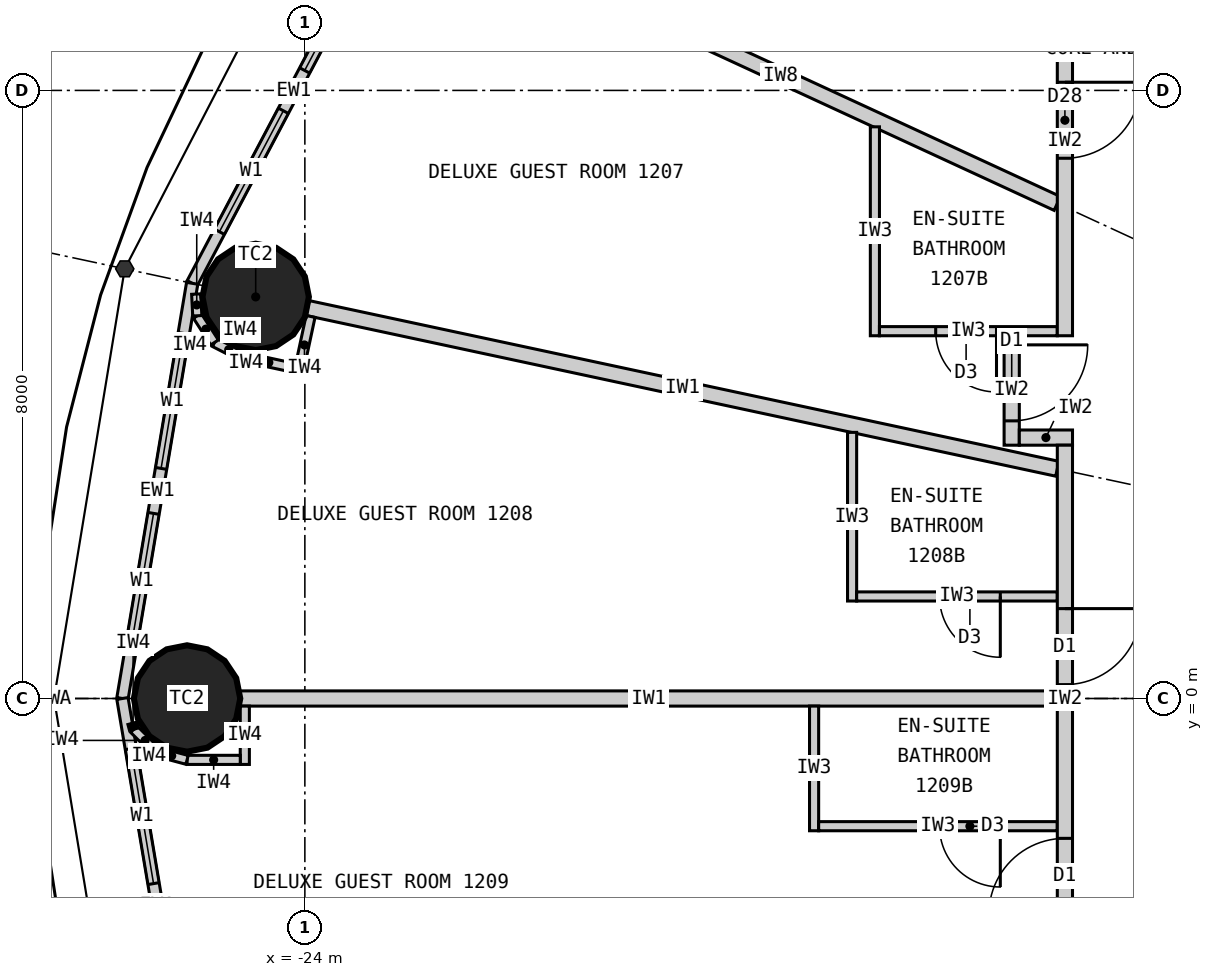
"""IFC4 building model, lengths in metres.
Left out: names, types, materials, properties, quantities, classifications, styles, units other than length and angle.
Written with IfcOpenShell. Run it as: python <this file> out.ifc"""

import sys

from ifc_helpers import new_model, si_unit, direction, frame, frame_2d, origin, origin_2d, place, context, subcontext, project, spatial, rectangle, circle, extrude, element, fill, save


model = new_model("IFC4")
c1 = context("Model", 3, precision=1e-05, world=origin(), true_north=direction((0.0, 1.0)))
c2 = subcontext(c1, "Body", "Model", "MODEL_VIEW")
j1 = project(units=[si_unit("LENGTHUNIT", "METRE"), si_unit("PLANEANGLEUNIT", "RADIAN")], contexts=[c1])
p1 = place(None, origin())
s1 = spatial("IfcSite", under=j1, at=p1, CompositionType="ELEMENT")
p2 = place(p1, origin())
s2 = spatial("IfcBuilding", under=s1, at=p2, CompositionType="ELEMENT")
p3 = place(p2, frame((0.0, 0.0, 54.0)))
s3 = spatial("IfcBuildingStorey", under=s2, at=p3, CompositionType="ELEMENT", Elevation=54.0)
for number, where, z_axis, x_axis in (
    (1, (-24.647, 5.283, 0.0), (0.0, 0.0, 1.0), (1.0, 0.0, 0.0)),
    (2, (-25.55, 0.0, 0.0), (0.0, 0.0, 1.0), (1.0, 0.0, 0.0)),
):
    element("IfcColumn", number, at=place(p3, frame(where, z_axis=z_axis, x_axis=x_axis)), inside=s3, PredefinedType="COLUMN", context=c2, shape_type="SweptSolid", body=[
        extrude(circle(Radius=0.7, at=origin_2d()), origin(), (0.0, 0.0, 1.0), 3.3),
    ])
p4 = place(p3, frame((-22.803, 10.532, 0.0), z_axis=(0.0, 0.0, 1.0), x_axis=(-0.467296867008, -0.884100468321, 0.0)))
e3 = element("IfcWall", 3, at=p4, inside=s3, PredefinedType="ELEMENTEDWALL", context=c2, shape_type="SweptSolid", body=[
    extrude(rectangle(XDim=5.734, YDim=0.15, at=frame_2d((2.867, 0.0))), origin(), (0.0, 0.0, 1.0), 3.12),
])
p5 = place(p4, frame((0.767, 0.0, 0.9)))
e4 = element("IfcOpeningElement", 4, at=p5, cuts=e3, PredefinedType="OPENING", context=c2, shape_type="SweptSolid", body=[
    extrude(rectangle(XDim=1.8, YDim=1.9, at=frame_2d((0.9, 0.95))), frame((0.0, 0.085, 0.0), z_axis=(0.0, -1.0, 0.0), x_axis=(1.0, 0.0, 0.0)), (0.0, 0.0, 1.0), 0.17),
])
p6 = place(p4, frame((3.167, 0.0, 0.9)))
e5 = element("IfcOpeningElement", 5, at=p6, cuts=e3, PredefinedType="OPENING", context=c2, shape_type="SweptSolid", body=[
    extrude(rectangle(XDim=1.8, YDim=1.9, at=frame_2d((0.9, 0.95))), frame((0.0, 0.085, 0.0), z_axis=(0.0, -1.0, 0.0), x_axis=(1.0, 0.0, 0.0)), (0.0, 0.0, 1.0), 0.17),
])
p7 = place(p3, frame((-25.482, 5.462, 0.0), z_axis=(0.0, 0.0, 1.0), x_axis=(-0.165642551694, -0.986185857264, 0.0)))
e6 = element("IfcWall", 6, at=p7, inside=s3, PredefinedType="ELEMENTEDWALL", context=c2, shape_type="SweptSolid", body=[
    extrude(rectangle(XDim=5.539, YDim=0.15, at=frame_2d((2.77, 0.0))), origin(), (0.0, 0.0, 1.0), 3.12),
])
p8 = place(p7, frame((0.669, 0.0, 0.9)))
e7 = element("IfcOpeningElement", 7, at=p8, cuts=e6, PredefinedType="OPENING", context=c2, shape_type="SweptSolid", body=[
    extrude(rectangle(XDim=1.8, YDim=1.9, at=frame_2d((0.9, 0.95))), frame((0.0, 0.085, 0.0), z_axis=(0.0, -1.0, 0.0), x_axis=(1.0, 0.0, 0.0)), (0.0, 0.0, 1.0), 0.17),
])
p9 = place(p7, frame((3.07, 0.0, 0.9)))
e8 = element("IfcOpeningElement", 8, at=p9, cuts=e6, PredefinedType="OPENING", context=c2, shape_type="SweptSolid", body=[
    extrude(rectangle(XDim=1.8, YDim=1.9, at=frame_2d((0.9, 0.95))), frame((0.0, 0.085, 0.0), z_axis=(0.0, -1.0, 0.0), x_axis=(1.0, 0.0, 0.0)), (0.0, 0.0, 1.0), 0.17),
])
p10 = place(p3, frame((-26.4, 0.0, 0.0), z_axis=(0.0, 0.0, 1.0), x_axis=(0.165642551694, -0.986185857264, 0.0)))
e9 = element("IfcWall", 9, at=p10, inside=s3, PredefinedType="ELEMENTEDWALL", context=c2, shape_type="SweptSolid", body=[
    extrude(rectangle(XDim=5.539, YDim=0.15, at=frame_2d((2.77, 0.0))), origin(), (0.0, 0.0, 1.0), 3.12),
])
p11 = place(p10, frame((0.669, 0.0, 0.9)))
e10 = element("IfcOpeningElement", 10, at=p11, cuts=e9, PredefinedType="OPENING", context=c2, shape_type="SweptSolid", body=[
    extrude(rectangle(XDim=1.8, YDim=1.9, at=frame_2d((0.9, 0.95))), frame((0.0, 0.085, 0.0), z_axis=(0.0, -1.0, 0.0), x_axis=(1.0, 0.0, 0.0)), (0.0, 0.0, 1.0), 0.17),
])
p12 = place(p10, frame((3.07, 0.0, 0.9)))
e11 = element("IfcOpeningElement", 11, at=p12, cuts=e9, PredefinedType="OPENING", context=c2, shape_type="SweptSolid", body=[
    extrude(rectangle(XDim=1.8, YDim=1.9, at=frame_2d((0.9, 0.95))), frame((0.0, 0.085, 0.0), z_axis=(0.0, -1.0, 0.0), x_axis=(1.0, 0.0, 0.0)), (0.0, 0.0, 1.0), 0.17),
])
p13 = place(p3, frame((-14.1, 6.512, 0.0), z_axis=(0.0, 0.0, 1.0), x_axis=(-0.907832871056, 0.419332181247, 0.0)))
e12 = element("IfcWall", 12, at=p13, inside=s3, PredefinedType="PARTITIONING", context=c2, shape_type="SweptSolid", body=[
    extrude(rectangle(XDim=8.023, YDim=0.2, at=frame_2d((4.011, 0.0))), origin(), (0.0, 0.0, 1.0), 2.32),
])
p14 = place(p3, frame((-14.1, 3.022, 0.0), z_axis=(0.0, 0.0, 1.0), x_axis=(-0.977790014929, 0.209586943072, 0.0)))
e13 = element("IfcWall", 13, at=p14, inside=s3, PredefinedType="PARTITIONING", context=c2, shape_type="SweptSolid", body=[
    extrude(rectangle(XDim=10.087, YDim=0.2, at=frame_2d((5.043, 0.0))), origin(), (0.0, 0.0, 1.0), 2.32),
])
p15 = place(p3, frame((-14.1, 0.0, 0.0), z_axis=(0.0, 0.0, 1.0), x_axis=(-1.0, 0.0, 0.0)))
e14 = element("IfcWall", 14, at=p15, inside=s3, PredefinedType="PARTITIONING", context=c2, shape_type="SweptSolid", body=[
    extrude(rectangle(XDim=10.75, YDim=0.2, at=frame_2d((5.375, 0.0))), origin(), (0.0, 0.0, 1.0), 2.27),
])
p16 = place(p3, frame((-16.5, 7.521, 0.0), z_axis=(0.0, 0.0, 1.0), x_axis=(0.0, -1.0, 0.0)))
e15 = element("IfcWall", 15, at=p16, inside=s3, PredefinedType="PARTITIONING", context=c2, shape_type="SweptSolid", body=[
    extrude(rectangle(XDim=2.749, YDim=0.12, at=frame_2d((1.374, 0.0))), origin(), (0.0, 0.0, 1.0), 3.12),
])
p17 = place(p3, frame((-14.1, 4.833, 0.0), z_axis=(0.0, 0.0, 1.0), x_axis=(-1.0, 0.0, 0.0)))
e16 = element("IfcWall", 16, at=p17, inside=s3, PredefinedType="PARTITIONING", context=c2, shape_type="SweptSolid", body=[
    extrude(rectangle(XDim=2.34, YDim=0.12, at=frame_2d((1.17, 0.0))), origin(), (0.0, 0.0, 1.0), 3.12),
])
p18 = place(p17, frame((0.8, 0.0, 0.0)))
e17 = element("IfcOpeningElement", 17, at=p18, cuts=e16, PredefinedType="OPENING", context=c2, shape_type="SweptSolid", body=[
    extrude(rectangle(XDim=0.8, YDim=2.1, at=frame_2d((0.4, 1.05))), frame((0.0, 0.07, 0.0), z_axis=(0.0, -1.0, 0.0), x_axis=(1.0, 0.0, 0.0)), (0.0, 0.0, 1.0), 0.14),
])
p19 = place(p3, frame((-16.8, 3.501, 0.0), z_axis=(0.0, 0.0, 1.0), x_axis=(0.0, -1.0, 0.0)))
e18 = element("IfcWall", 18, at=p19, inside=s3, PredefinedType="PARTITIONING", context=c2, shape_type="SweptSolid", body=[
    extrude(rectangle(XDim=2.219, YDim=0.12, at=frame_2d((1.109, 0.0))), origin(), (0.0, 0.0, 1.0), 3.12),
])
p20 = place(p3, frame((-14.1, 1.343, 0.0), z_axis=(0.0, 0.0, 1.0), x_axis=(-1.0, 0.0, 0.0)))
e19 = element("IfcWall", 19, at=p20, inside=s3, PredefinedType="PARTITIONING", context=c2, shape_type="SweptSolid", body=[
    extrude(rectangle(XDim=2.64, YDim=0.12, at=frame_2d((1.32, 0.0))), origin(), (0.0, 0.0, 1.0), 3.12),
])
p21 = place(p20, frame((0.75, 0.0, 0.0)))
e20 = element("IfcOpeningElement", 20, at=p21, cuts=e19, PredefinedType="OPENING", context=c2, shape_type="SweptSolid", body=[
    extrude(rectangle(XDim=0.8, YDim=2.1, at=frame_2d((0.4, 1.05))), frame((0.0, 0.07, 0.0), z_axis=(0.0, -1.0, 0.0), x_axis=(1.0, 0.0, 0.0)), (0.0, 0.0, 1.0), 0.14),
])
p22 = place(p3, frame((-17.3, -0.1, 0.0), z_axis=(0.0, 0.0, 1.0), x_axis=(0.0, -1.0, 0.0)))
e21 = element("IfcWall", 21, at=p22, inside=s3, PredefinedType="PARTITIONING", context=c2, shape_type="SweptSolid", body=[
    extrude(rectangle(XDim=1.64, YDim=0.12, at=frame_2d((0.82, 0.0))), origin(), (0.0, 0.0, 1.0), 3.12),
])
p23 = place(p3, frame((-14.1, -1.68, 0.0), z_axis=(0.0, 0.0, 1.0), x_axis=(-1.0, 0.0, 0.0)))
e22 = element("IfcWall", 22, at=p23, inside=s3, PredefinedType="PARTITIONING", context=c2, shape_type="SweptSolid", body=[
    extrude(rectangle(XDim=3.14, YDim=0.12, at=frame_2d((1.57, 0.0))), origin(), (0.0, 0.0, 1.0), 3.12),
])
p24 = place(p23, frame((0.75, 0.0, 0.0)))
e23 = element("IfcOpeningElement", 23, at=p24, cuts=e22, PredefinedType="OPENING", context=c2, shape_type="SweptSolid", body=[
    extrude(rectangle(XDim=0.8, YDim=2.1, at=frame_2d((0.4, 1.05))), frame((0.0, 0.07, 0.0), z_axis=(0.0, -1.0, 0.0), x_axis=(1.0, 0.0, 0.0)), (0.0, 0.0, 1.0), 0.14),
])
p25 = place(p3, frame((-14.7, 4.772, 0.0), z_axis=(0.0, 0.0, 1.0), x_axis=(0.0, -1.0, 0.0)))
e24 = element("IfcWall", 24, at=p25, inside=s3, PredefinedType="PARTITIONING", context=c2, shape_type="SweptSolid", body=[
    extrude(rectangle(XDim=1.44, YDim=0.2, at=frame_2d((0.72, 0.0))), origin(), (0.0, 0.0, 1.0), 3.12),
])
p26 = place(p25, frame((0.12, 0.0, 0.0)))
e25 = element("IfcOpeningElement", 25, at=p26, cuts=e24, PredefinedType="OPENING", context=c2, shape_type="SweptSolid", body=[
    extrude(rectangle(XDim=1.0, YDim=2.2, at=frame_2d((0.5, 1.1))), frame((0.0, 0.11, 0.0), z_axis=(0.0, -1.0, 0.0), x_axis=(1.0, 0.0, 0.0)), (0.0, 0.0, 1.0), 0.22),
])
p27 = place(p3, frame((-13.9, 3.433, 0.0), z_axis=(0.0, 0.0, 1.0), x_axis=(-1.0, 0.0, 0.0)))
e26 = element("IfcWall", 26, at=p27, inside=s3, PredefinedType="PARTITIONING", context=c2, shape_type="SweptSolid", body=[
    extrude(rectangle(XDim=0.7, YDim=0.2, at=frame_2d((0.35, 0.0))), origin(), (0.0, 0.0, 1.0), 2.32),
])
p28 = place(p3, frame((-14.0, 9.9, 0.0), z_axis=(0.0, 0.0, 1.0), x_axis=(0.0, -1.0, 0.0)))
e27 = element("IfcWall", 27, at=p28, inside=s3, PredefinedType="PARTITIONING", context=c2, shape_type="SweptSolid", body=[
    extrude(rectangle(XDim=5.127, YDim=0.2, at=frame_2d((2.564, 0.0))), origin(), (0.0, 0.0, 1.0), 3.12),
])
p29 = place(p28, frame((1.792, 0.0, 0.0)))
e28 = element("IfcOpeningElement", 28, at=p29, cuts=e27, PredefinedType="OPENING", context=c2, shape_type="SweptSolid", body=[
    extrude(rectangle(XDim=1.0, YDim=2.2, at=frame_2d((0.5, 1.1))), frame((0.0, 0.11, 0.0), z_axis=(0.0, -1.0, 0.0), x_axis=(1.0, 0.0, 0.0)), (0.0, 0.0, 1.0), 0.22),
])
p30 = place(p3, frame((-14.0, 3.333, 0.0), z_axis=(0.0, 0.0, 1.0), x_axis=(0.0, -1.0, 0.0)))
e29 = element("IfcWall", 29, at=p30, inside=s3, PredefinedType="PARTITIONING", context=c2, shape_type="SweptSolid", body=[
    extrude(rectangle(XDim=6.665, YDim=0.2, at=frame_2d((3.333, 0.0))), origin(), (0.0, 0.0, 1.0), 3.12),
])
p31 = place(p30, frame((2.15, 0.0, 0.0)))
e30 = element("IfcOpeningElement", 30, at=p31, cuts=e29, PredefinedType="OPENING", context=c2, shape_type="SweptSolid", body=[
    extrude(rectangle(XDim=1.0, YDim=2.2, at=frame_2d((0.5, 1.1))), frame((0.0, 0.11, 0.0), z_axis=(0.0, -1.0, 0.0), x_axis=(1.0, 0.0, 0.0)), (0.0, 0.0, 1.0), 0.22),
])
p32 = place(p30, frame((5.173, 0.0, 0.0)))
e31 = element("IfcOpeningElement", 31, at=p32, cuts=e29, PredefinedType="OPENING", context=c2, shape_type="SweptSolid", body=[
    extrude(rectangle(XDim=1.0, YDim=2.2, at=frame_2d((0.5, 1.1))), frame((0.0, 0.11, 0.0), z_axis=(0.0, -1.0, 0.0), x_axis=(1.0, 0.0, 0.0)), (0.0, 0.0, 1.0), 0.22),
])
p33 = place(p3, frame((-23.925, 5.026, 0.0), z_axis=(0.0, 0.0, 1.0), x_axis=(-0.209681192172, -0.977769808109, 0.0)))
e32 = element("IfcWall", 32, at=p33, inside=s3, PredefinedType="PARTITIONING", context=c2, shape_type="SweptSolid", body=[
    extrude(rectangle(XDim=0.767, YDim=0.12, at=frame_2d((0.384, 0.0))), origin(), (0.0, 0.0, 1.0), 3.12),
])
p34 = place(p3, frame((-24.132, 4.347, 0.0), z_axis=(0.0, 0.0, 1.0), x_axis=(-0.977776882509, 0.209648200638, 0.0)))
e33 = element("IfcWall", 33, at=p34, inside=s3, PredefinedType="PARTITIONING", context=c2, shape_type="SweptSolid", body=[
    extrude(rectangle(XDim=0.7, YDim=0.12, at=frame_2d((0.35, 0.0))), origin(), (0.0, 0.0, 1.0), 3.12),
])
for number, where, z_axis, x_axis in (
    (34, (-24.816, 4.494, 0.0), (0.0, 0.0, 1.0), (-0.89, 0.455, 0.0)),
    (35, (-25.188, 4.684, 0.0), (0.0, 0.0, 1.0), (-0.543, 0.84, 0.0)),
):
    element("IfcWall", number, at=place(p3, frame(where, z_axis=z_axis, x_axis=x_axis)), inside=s3, PredefinedType="PARTITIONING", context=c2, shape_type="SweptSolid", body=[
        extrude(rectangle(XDim=0.418, YDim=0.12, at=frame_2d((0.209, 0.0))), origin(), (0.0, 0.0, 1.0), 3.12),
    ])
p35 = place(p3, frame((-25.416, 5.035, 0.0), z_axis=(0.0, 0.0, 1.0), x_axis=(-0.050406329159, 0.998728793007, 0.0)))
e36 = element("IfcWall", 36, at=p35, inside=s3, PredefinedType="PARTITIONING", context=c2, shape_type="SweptSolid", body=[
    extrude(rectangle(XDim=0.286, YDim=0.12, at=frame_2d((0.143, 0.0))), origin(), (0.0, 0.0, 1.0), 3.12),
])
p36 = place(p3, frame((-24.79, -0.1, 0.0), z_axis=(0.0, 0.0, 1.0), x_axis=(0.0, -1.0, 0.0)))
e37 = element("IfcWall", 37, at=p36, inside=s3, PredefinedType="PARTITIONING", context=c2, shape_type="SweptSolid", body=[
    extrude(rectangle(XDim=0.767, YDim=0.12, at=frame_2d((0.384, 0.0))), origin(), (0.0, 0.0, 1.0), 3.12),
])
p37 = place(p3, frame((-24.85, -0.808, 0.0), z_axis=(0.0, 0.0, 1.0), x_axis=(-1.0, 0.0, 0.0)))
e38 = element("IfcWall", 38, at=p37, inside=s3, PredefinedType="PARTITIONING", context=c2, shape_type="SweptSolid", body=[
    extrude(rectangle(XDim=0.7, YDim=0.12, at=frame_2d((0.35, 0.0))), origin(), (0.0, 0.0, 1.0), 3.12),
])
p38 = place(p3, frame((-25.55, -0.808, 0.0), z_axis=(0.0, 0.0, 1.0), x_axis=(-0.965807183573, 0.2592614205, 0.0)))
e39 = element("IfcWall", 39, at=p38, inside=s3, PredefinedType="PARTITIONING", context=c2, shape_type="SweptSolid", body=[
    extrude(rectangle(XDim=0.418, YDim=0.12, at=frame_2d((0.209, 0.0))), origin(), (0.0, 0.0, 1.0), 3.12),
])
p39 = place(p3, frame((-25.954, -0.699, 0.0), z_axis=(0.0, 0.0, 1.0), x_axis=(-0.707106781187, 0.707106781187, 0.0)))
e40 = element("IfcWall", 40, at=p39, inside=s3, PredefinedType="PARTITIONING", context=c2, shape_type="SweptSolid", body=[
    extrude(rectangle(XDim=0.418, YDim=0.12, at=frame_2d((0.209, 0.0))), origin(), (0.0, 0.0, 1.0), 3.12),
])
p40 = place(p3, frame((-26.249, -0.404, 0.0), z_axis=(0.0, 0.0, 1.0), x_axis=(-0.259754282609, 0.965674744759, 0.0)))
e41 = element("IfcWall", 41, at=p40, inside=s3, PredefinedType="PARTITIONING", context=c2, shape_type="SweptSolid", body=[
    extrude(rectangle(XDim=0.08, YDim=0.12, at=frame_2d((0.04, 0.0))), origin(), (0.0, 0.0, 1.0), 3.12),
])
p41 = place(p5, origin())
e42 = element("IfcWindow", 42, at=p41, inside=s3, PartitioningType="SINGLE_PANEL", PredefinedType="WINDOW", context=c2, shape_type="SweptSolid", body=[
    extrude(rectangle(XDim=1.8, YDim=1.9, at=frame_2d((0.9, 0.95))), frame((0.0, 0.03, 0.0), z_axis=(0.0, -1.0, 0.0), x_axis=(1.0, 0.0, 0.0)), (0.0, 0.0, 1.0), 0.06),
])
fill(e4, e42)
p42 = place(p6, origin())
e43 = element("IfcWindow", 43, at=p42, inside=s3, PartitioningType="SINGLE_PANEL", PredefinedType="WINDOW", context=c2, shape_type="SweptSolid", body=[
    extrude(rectangle(XDim=1.8, YDim=1.9, at=frame_2d((0.9, 0.95))), frame((0.0, 0.03, 0.0), z_axis=(0.0, -1.0, 0.0), x_axis=(1.0, 0.0, 0.0)), (0.0, 0.0, 1.0), 0.06),
])
fill(e5, e43)
p43 = place(p8, origin())
e44 = element("IfcWindow", 44, at=p43, inside=s3, PartitioningType="SINGLE_PANEL", PredefinedType="WINDOW", context=c2, shape_type="SweptSolid", body=[
    extrude(rectangle(XDim=1.8, YDim=1.9, at=frame_2d((0.9, 0.95))), frame((0.0, 0.03, 0.0), z_axis=(0.0, -1.0, 0.0), x_axis=(1.0, 0.0, 0.0)), (0.0, 0.0, 1.0), 0.06),
])
fill(e7, e44)
p44 = place(p9, origin())
e45 = element("IfcWindow", 45, at=p44, inside=s3, PartitioningType="SINGLE_PANEL", PredefinedType="WINDOW", context=c2, shape_type="SweptSolid", body=[
    extrude(rectangle(XDim=1.8, YDim=1.9, at=frame_2d((0.9, 0.95))), frame((0.0, 0.03, 0.0), z_axis=(0.0, -1.0, 0.0), x_axis=(1.0, 0.0, 0.0)), (0.0, 0.0, 1.0), 0.06),
])
fill(e8, e45)
p45 = place(p11, origin())
e46 = element("IfcWindow", 46, at=p45, inside=s3, PartitioningType="SINGLE_PANEL", PredefinedType="WINDOW", context=c2, shape_type="SweptSolid", body=[
    extrude(rectangle(XDim=1.8, YDim=1.9, at=frame_2d((0.9, 0.95))), frame((0.0, 0.03, 0.0), z_axis=(0.0, -1.0, 0.0), x_axis=(1.0, 0.0, 0.0)), (0.0, 0.0, 1.0), 0.06),
])
fill(e10, e46)
p46 = place(p29, origin())
e47 = element("IfcDoor", 47, at=p46, inside=s3, OperationType="SINGLE_SWING_LEFT", PredefinedType="DOOR", context=c2, shape_type="SweptSolid", body=[
    extrude(rectangle(XDim=1.0, YDim=2.2, at=frame_2d((0.5, 1.1))), frame((0.0, 0.025, 0.0), z_axis=(0.0, -1.0, 0.0), x_axis=(1.0, 0.0, 0.0)), (0.0, 0.0, 1.0), 0.05),
])
fill(e28, e47)
p47 = place(p18, origin())
e48 = element("IfcDoor", 48, at=p47, inside=s3, OperationType="SINGLE_SWING_LEFT", PredefinedType="DOOR", context=c2, shape_type="SweptSolid", body=[
    extrude(rectangle(XDim=0.8, YDim=2.1, at=frame_2d((0.4, 1.05))), frame((0.0, 0.025, 0.0), z_axis=(0.0, -1.0, 0.0), x_axis=(1.0, 0.0, 0.0)), (0.0, 0.0, 1.0), 0.05),
])
fill(e17, e48)
p48 = place(p26, origin())
e49 = element("IfcDoor", 49, at=p48, inside=s3, OperationType="SINGLE_SWING_LEFT", PredefinedType="DOOR", context=c2, shape_type="SweptSolid", body=[
    extrude(rectangle(XDim=1.0, YDim=2.2, at=frame_2d((0.5, 1.1))), frame((0.0, 0.025, 0.0), z_axis=(0.0, -1.0, 0.0), x_axis=(1.0, 0.0, 0.0)), (0.0, 0.0, 1.0), 0.05),
])
fill(e25, e49)
p49 = place(p21, origin())
e50 = element("IfcDoor", 50, at=p49, inside=s3, OperationType="SINGLE_SWING_LEFT", PredefinedType="DOOR", context=c2, shape_type="SweptSolid", body=[
    extrude(rectangle(XDim=0.8, YDim=2.1, at=frame_2d((0.4, 1.05))), frame((0.0, 0.025, 0.0), z_axis=(0.0, -1.0, 0.0), x_axis=(1.0, 0.0, 0.0)), (0.0, 0.0, 1.0), 0.05),
])
fill(e20, e50)
p50 = place(p31, origin())
e51 = element("IfcDoor", 51, at=p50, inside=s3, OperationType="SINGLE_SWING_LEFT", PredefinedType="DOOR", context=c2, shape_type="SweptSolid", body=[
    extrude(rectangle(XDim=1.0, YDim=2.2, at=frame_2d((0.5, 1.1))), frame((0.0, 0.025, 0.0), z_axis=(0.0, -1.0, 0.0), x_axis=(1.0, 0.0, 0.0)), (0.0, 0.0, 1.0), 0.05),
])
fill(e30, e51)
p51 = place(p24, origin())
e52 = element("IfcDoor", 52, at=p51, inside=s3, OperationType="SINGLE_SWING_LEFT", PredefinedType="DOOR", context=c2, shape_type="SweptSolid", body=[
    extrude(rectangle(XDim=0.8, YDim=2.1, at=frame_2d((0.4, 1.05))), frame((0.0, 0.025, 0.0), z_axis=(0.0, -1.0, 0.0), x_axis=(1.0, 0.0, 0.0)), (0.0, 0.0, 1.0), 0.05),
])
fill(e23, e52)
p52 = place(p32, origin())
e53 = element("IfcDoor", 53, at=p52, inside=s3, OperationType="SINGLE_SWING_RIGHT", PredefinedType="DOOR", context=c2, shape_type="SweptSolid", body=[
    extrude(rectangle(XDim=1.0, YDim=2.2, at=frame_2d((0.5, 1.1))), frame((0.0, 0.025, 0.0), z_axis=(0.0, -1.0, 0.0), x_axis=(1.0, 0.0, 0.0)), (0.0, 0.0, 1.0), 0.05),
])
fill(e31, e53)
save(model, sys.argv[1])
